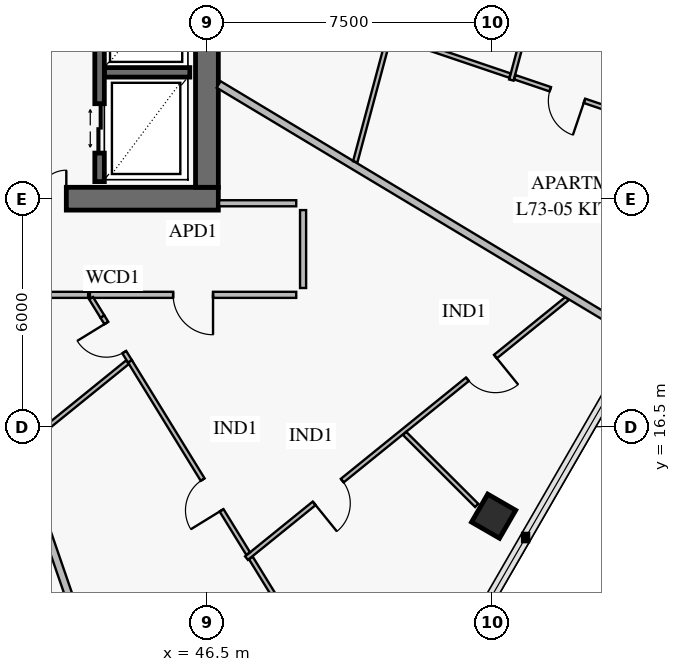
"""IFC4 building model, lengths in metres.
Left out: names, types, materials, properties, quantities, classifications, styles, units other than length and angle.
Written with IfcOpenShell. Run it as: python <this file> out.ifc"""

import sys

from ifc_helpers import new_model, si_unit, direction, frame, frame_2d, origin, origin_2d, place, context, subcontext, project, spatial, rectangle, extrude, element, fill, save


model = new_model("IFC4")
c1 = context("Model", 3, precision=1e-05, world=origin(), true_north=direction((0.0, 1.0)))
c2 = subcontext(c1, "Body", "Model", "MODEL_VIEW")
j1 = project(units=[si_unit("LENGTHUNIT", "METRE"), si_unit("PLANEANGLEUNIT", "RADIAN")], contexts=[c1])
p1 = place(None, origin())
s1 = spatial("IfcSite", under=j1, at=p1, CompositionType="ELEMENT")
p2 = place(p1, origin())
s2 = spatial("IfcBuilding", under=s1, at=p2, CompositionType="ELEMENT")
p3 = place(p2, frame((0.0, 0.0, 288.2)))
s3 = spatial("IfcBuildingStorey", under=s2, at=p3, CompositionType="ELEMENT", Elevation=288.2)
p4 = place(p3, frame((37.35, 22.5, 0.0), z_axis=(0.0, 0.0, 1.0), x_axis=(1.0, 0.0, 0.0)))
e1 = element("IfcWall", 1, at=p4, inside=s3, PredefinedType="SHEAR", context=c2, shape_type="SweptSolid", body=[
    extrude(rectangle(XDim=9.45, YDim=0.6, at=frame_2d((4.725, 0.0))), origin(), (0.0, 0.0, 1.0), 3.8),
])
p5 = place(p4, frame((3.95, 0.0, 0.0)))
e2 = element("IfcOpeningElement", 2, at=p5, cuts=e1, PredefinedType="OPENING", context=c2, shape_type="SweptSolid", body=[
    extrude(rectangle(XDim=1.5, YDim=2.15, at=frame_2d((0.75, 1.075))), frame((0.0, 0.312, 0.0), z_axis=(0.0, -1.0, 0.0), x_axis=(1.0, 0.0, 0.0)), (0.0, 0.0, 1.0), 0.624),
])
p6 = place(p3, frame((46.5, 22.8, 0.0), z_axis=(0.0, 0.0, 1.0), x_axis=(0.0, 1.0, 0.0)))
e3 = element("IfcWall", 3, at=p6, inside=s3, PredefinedType="SHEAR", context=c2, shape_type="SweptSolid", body=[
    extrude(rectangle(XDim=18.4, YDim=0.6, at=frame_2d((9.2, 0.0))), origin(), (0.0, 0.0, 1.0), 3.8),
])
p7 = place(p6, frame((8.95, 0.0, 0.0)))
e4 = element("IfcOpeningElement", 4, at=p7, cuts=e3, PredefinedType="OPENING", context=c2, shape_type="SweptSolid", body=[
    extrude(rectangle(XDim=1.1, YDim=2.15, at=frame_2d((0.55, 1.075))), frame((0.0, 0.312, 0.0), z_axis=(0.0, -1.0, 0.0), x_axis=(1.0, 0.0, 0.0)), (0.0, 0.0, 1.0), 0.624),
])
p8 = place(p3, frame((54.044, 14.145, 0.0), z_axis=(0.0, 0.0, 1.0), x_axis=(0.5, 0.866025403784, 0.0)))
e5 = element("IfcColumn", 5, at=p8, inside=s3, PredefinedType="COLUMN", context=c2, shape_type="SweptSolid", body=[
    extrude(rectangle(XDim=0.85, YDim=0.85, at=origin_2d()), origin(), (0.0, 0.0, 1.0), 3.55),
])
p9 = place(p3, frame((43.8, 25.825, 0.0), z_axis=(0.0, 0.0, 1.0), x_axis=(1.0, 0.0, 0.0)))
e6 = element("IfcWall", 6, at=p9, inside=s3, PredefinedType="SOLIDWALL", context=c2, shape_type="SweptSolid", body=[
    extrude(rectangle(XDim=2.25, YDim=0.25, at=frame_2d((1.125, 0.0))), origin(), (0.0, 0.0, 1.0), 3.8),
])
p10 = place(p3, frame((43.675, 22.95, 0.0), z_axis=(0.0, 0.0, 1.0), x_axis=(0.0, 1.0, 0.0)))
e7 = element("IfcWall", 7, at=p10, inside=s3, PredefinedType="SOLIDWALL", context=c2, shape_type="SweptSolid", body=[
    extrude(rectangle(XDim=8.2, YDim=0.25, at=frame_2d((4.1, 0.0))), origin(), (0.0, 0.0, 1.0), 3.8),
])
p11 = place(p10, frame((0.75, 0.0, 0.0)))
e8 = element("IfcOpeningElement", 8, at=p11, cuts=e7, PredefinedType="OPENING", context=c2, shape_type="SweptSolid", body=[
    extrude(rectangle(XDim=1.3, YDim=2.3, at=frame_2d((0.65, 1.15))), frame((0.0, 0.137, 0.0), z_axis=(0.0, -1.0, 0.0), x_axis=(1.0, 0.0, 0.0)), (0.0, 0.0, 1.0), 0.274),
])
p12 = place(p10, frame((3.7, 0.0, 0.0)))
e9 = element("IfcOpeningElement", 9, at=p12, cuts=e7, PredefinedType="OPENING", context=c2, shape_type="SweptSolid", body=[
    extrude(rectangle(XDim=1.3, YDim=2.3, at=frame_2d((0.65, 1.15))), frame((0.0, 0.137, 0.0), z_axis=(0.0, -1.0, 0.0), x_axis=(1.0, 0.0, 0.0)), (0.0, 0.0, 1.0), 0.274),
])
p13 = place(p10, frame((6.62, 0.0, 0.0)))
e10 = element("IfcOpeningElement", 10, at=p13, cuts=e7, PredefinedType="OPENING", context=c2, shape_type="SweptSolid", body=[
    extrude(rectangle(XDim=0.9, YDim=2.1, at=frame_2d((0.45, 1.05))), frame((0.0, 0.137, 0.0), z_axis=(0.0, -1.0, 0.0), x_axis=(1.0, 0.0, 0.0)), (0.0, 0.0, 1.0), 0.274),
])
p14 = place(p3, frame((47.542, 13.042, 0.0), z_axis=(0.0, 0.0, 1.0), x_axis=(0.777147459209, 0.629318541476, 0.0)))
e11 = element("IfcWall", 11, at=p14, inside=s3, PredefinedType="PARTITIONING", context=c2, shape_type="SweptSolid", body=[
    extrude(rectangle(XDim=10.857, YDim=0.12, at=frame_2d((5.428, 0.0))), origin(), (0.0, 0.0, 1.0), 2.95),
])
p15 = place(p14, frame((2.291, 0.0, 0.0)))
e12 = element("IfcOpeningElement", 12, at=p15, cuts=e11, PredefinedType="OPENING", context=c2, shape_type="SweptSolid", body=[
    extrude(rectangle(XDim=0.95, YDim=2.1, at=frame_2d((0.475, 1.05))), frame((0.0, 0.072, 0.0), z_axis=(0.0, -1.0, 0.0), x_axis=(1.0, 0.0, 0.0)), (0.0, 0.0, 1.0), 0.144),
])
p16 = place(p14, frame((7.479, 0.0, 0.0)))
e13 = element("IfcOpeningElement", 13, at=p16, cuts=e11, PredefinedType="OPENING", context=c2, shape_type="SweptSolid", body=[
    extrude(rectangle(XDim=0.95, YDim=2.1, at=frame_2d((0.475, 1.05))), frame((0.0, 0.072, 0.0), z_axis=(0.0, -1.0, 0.0), x_axis=(1.0, 0.0, 0.0)), (0.0, 0.0, 1.0), 0.144),
])
p17 = place(p3, frame((43.749, 19.4, 0.0), z_axis=(0.0, 0.0, 1.0), x_axis=(0.523959986515, -0.851742879355, 0.0)))
e14 = element("IfcWall", 14, at=p17, inside=s3, PredefinedType="PARTITIONING", context=c2, shape_type="SweptSolid", body=[
    extrude(rectangle(XDim=1.388, YDim=0.12, at=frame_2d((0.694, 0.0))), origin(), (0.0, 0.0, 1.0), 3.55),
])
p18 = place(p17, frame((0.2, 0.0, 0.0)))
e15 = element("IfcOpeningElement", 15, at=p18, cuts=e14, PredefinedType="OPENING", context=c2, shape_type="SweptSolid", body=[
    extrude(rectangle(XDim=0.9, YDim=2.1, at=frame_2d((0.45, 1.05))), frame((0.0, 0.072, 0.0), z_axis=(0.0, -1.0, 0.0), x_axis=(1.0, 0.0, 0.0)), (0.0, 0.0, 1.0), 0.144),
])
p19 = place(p3, frame((44.476, 18.218, 0.0), z_axis=(0.0, 0.0, 1.0), x_axis=(0.523831119105, -0.851822140272, 0.0)))
e16 = element("IfcWall", 16, at=p19, inside=s3, PredefinedType="PARTITIONING", context=c2, shape_type="SweptSolid", body=[
    extrude(rectangle(XDim=5.934, YDim=0.12, at=frame_2d((2.967, 0.0))), origin(), (0.0, 0.0, 1.0), 3.55),
])
p20 = place(p19, frame((3.65, 0.0, 0.0)))
e17 = element("IfcOpeningElement", 17, at=p20, cuts=e16, PredefinedType="OPENING", context=c2, shape_type="SweptSolid", body=[
    extrude(rectangle(XDim=0.95, YDim=2.1, at=frame_2d((0.475, 1.05))), frame((0.0, 0.072, 0.0), z_axis=(0.0, -1.0, 0.0), x_axis=(1.0, 0.0, 0.0)), (0.0, 0.0, 1.0), 0.144),
])
p21 = place(p3, frame((47.656, 13.046, 0.0), z_axis=(0.0, 0.0, 1.0), x_axis=(0.523853024062, -0.851808669351, 0.0)))
e18 = element("IfcWall", 18, at=p21, inside=s3, PredefinedType="PARTITIONING", context=c2, shape_type="SweptSolid", body=[
    extrude(rectangle(XDim=2.229, YDim=0.12, at=frame_2d((1.115, 0.0))), origin(), (0.0, 0.0, 1.0), 2.93),
])
p22 = place(p3, frame((43.421, 19.97, 0.0), z_axis=(0.0, 0.0, 1.0), x_axis=(1.0, 0.0, 0.0)))
e19 = element("IfcWall", 19, at=p22, inside=s3, PredefinedType="PARTITIONING", context=c2, shape_type="SweptSolid", body=[
    extrude(rectangle(XDim=5.429, YDim=0.16, at=frame_2d((2.714, 0.0))), origin(), (0.0, 0.0, 1.0), 2.95),
])
p23 = place(p22, frame((2.189, 0.0, 0.0)))
e20 = element("IfcOpeningElement", 20, at=p23, cuts=e19, PredefinedType="OPENING", context=c2, shape_type="SweptSolid", body=[
    extrude(rectangle(XDim=1.05, YDim=2.15, at=frame_2d((0.525, 1.075))), frame((0.0, 0.092, 0.0), z_axis=(0.0, -1.0, 0.0), x_axis=(1.0, 0.0, 0.0)), (0.0, 0.0, 1.0), 0.184),
])
p24 = place(p3, frame((54.51, 25.622, 0.0), z_axis=(0.0, 0.0, 1.0), x_axis=(0.258833493947, 0.965921954617, 0.0)))
e21 = element("IfcWall", 21, at=p24, inside=s3, PredefinedType="PARTITIONING", context=c2, shape_type="SweptSolid", body=[
    extrude(rectangle(XDim=6.89, YDim=0.12, at=frame_2d((3.445, 0.0))), origin(), (0.0, 0.0, 1.0), 2.95),
])
p25 = place(p24, frame((1.193, 0.0, 0.0)))
e22 = element("IfcOpeningElement", 22, at=p25, cuts=e21, PredefinedType="OPENING", context=c2, shape_type="SweptSolid", body=[
    extrude(rectangle(XDim=0.95, YDim=2.1, at=frame_2d((0.475, 1.05))), frame((0.0, 0.072, 0.0), z_axis=(0.0, -1.0, 0.0), x_axis=(1.0, 0.0, 0.0)), (0.0, 0.0, 1.0), 0.144),
])
p26 = place(p24, frame((4.398, 0.0, 0.0)))
e23 = element("IfcOpeningElement", 23, at=p26, cuts=e21, PredefinedType="OPENING", context=c2, shape_type="SweptSolid", body=[
    extrude(rectangle(XDim=0.95, YDim=2.1, at=frame_2d((0.475, 1.05))), frame((0.0, 0.072, 0.0), z_axis=(0.0, -1.0, 0.0), x_axis=(1.0, 0.0, 0.0)), (0.0, 0.0, 1.0), 0.144),
])
p27 = place(p3, frame((51.323, 26.808, 0.0), z_axis=(0.0, 0.0, 1.0), x_axis=(0.947092742831, -0.320960023175, 0.0)))
e24 = element("IfcWall", 24, at=p27, inside=s3, PredefinedType="PARTITIONING", context=c2, shape_type="SweptSolid", body=[
    extrude(rectangle(XDim=3.325, YDim=0.12, at=frame_2d((1.663, 0.0))), origin(), (0.0, 0.0, 1.0), 3.15),
])
p28 = place(p3, frame((54.601, 25.697, 0.0), z_axis=(0.0, 0.0, 1.0), x_axis=(0.947084656941, -0.320983882128, 0.0)))
e25 = element("IfcWall", 25, at=p28, inside=s3, PredefinedType="PARTITIONING", context=c2, shape_type="SweptSolid", body=[
    extrude(rectangle(XDim=6.432, YDim=0.12, at=frame_2d((3.216, 0.0))), origin(), (0.0, 0.0, 1.0), 2.93),
])
p29 = place(p28, frame((0.985, 0.0, 0.0)))
e26 = element("IfcOpeningElement", 26, at=p29, cuts=e25, PredefinedType="OPENING", context=c2, shape_type="SweptSolid", body=[
    extrude(rectangle(XDim=0.95, YDim=2.1, at=frame_2d((0.475, 1.05))), frame((0.0, 0.072, 0.0), z_axis=(0.0, -1.0, 0.0), x_axis=(1.0, 0.0, 0.0)), (0.0, 0.0, 1.0), 0.144),
])
p30 = place(p3, frame((40.128, 20.01, 0.0), z_axis=(0.0, 0.0, 1.0), x_axis=(0.325569269748, -0.945518191573, 0.0)))
e27 = element("IfcWall", 27, at=p30, inside=s3, PredefinedType="PARTITIONING", context=c2, shape_type="SweptSolid", body=[
    extrude(rectangle(XDim=14.356, YDim=0.2, at=frame_2d((7.178, 0.0))), origin(), (0.0, 0.0, 1.0), 2.93),
])
p31 = place(p3, frame((51.702, 16.323, 0.0), z_axis=(0.0, 0.0, 1.0), x_axis=(0.707607548717, -0.706605658765, 0.0)))
e28 = element("IfcWall", 28, at=p31, inside=s3, PredefinedType="PARTITIONING", context=c2, shape_type="SweptSolid", body=[
    extrude(rectangle(XDim=2.68, YDim=0.12, at=frame_2d((1.34, 0.0))), origin(), (0.0, 0.0, 1.0), 2.95),
])
p32 = place(p3, frame((43.452, 19.882, 0.0), z_axis=(0.0, 0.0, 1.0), x_axis=(0.52366415223, -0.851924794609, 0.0)))
e29 = element("IfcWall", 29, at=p32, inside=s3, PredefinedType="PARTITIONING", context=c2, shape_type="SweptSolid", body=[
    extrude(rectangle(XDim=0.566, YDim=0.12, at=frame_2d((0.283, 0.0))), origin(), (0.0, 0.0, 1.0), 3.55),
])
p33 = place(p3, frame((41.639, 15.954, 0.0), z_axis=(0.0, 0.0, 1.0), x_axis=(0.777152329868, 0.629312526636, 0.0)))
e30 = element("IfcWall", 30, at=p33, inside=s3, PredefinedType="PARTITIONING", context=c2, shape_type="SweptSolid", body=[
    extrude(rectangle(XDim=3.564, YDim=0.12, at=frame_2d((1.782, 0.0))), origin(), (0.0, 0.0, 1.0), 3.55),
])
p34 = place(p3, frame((46.808, 25.506, 0.0), z_axis=(0.0, 0.0, 1.0), x_axis=(0.85716526059, -0.515041470212, 0.0)))
e31 = element("IfcWall", 31, at=p34, inside=s3, PredefinedType="PARTITIONING", context=c2, shape_type="SweptSolid", body=[
    extrude(rectangle(XDim=12.958, YDim=0.2, at=frame_2d((6.479, 0.0))), origin(), (0.0, 0.0, 1.0), 2.93),
])
p35 = place(p3, frame((50.403, 23.472, 0.0), z_axis=(0.0, 0.0, 1.0), x_axis=(0.25876844848, 0.965939382193, 0.0)))
e32 = element("IfcWall", 32, at=p35, inside=s3, PredefinedType="PARTITIONING", context=c2, shape_type="SweptSolid", body=[
    extrude(rectangle(XDim=3.394, YDim=0.12, at=frame_2d((1.697, 0.0))), origin(), (0.0, 0.0, 1.0), 3.55),
])
p36 = place(p3, frame((49.03, 20.15, 0.0), z_axis=(0.0, 0.0, 1.0), x_axis=(0.0, 1.0, 0.0)))
e33 = element("IfcWall", 33, at=p36, inside=s3, PredefinedType="PARTITIONING", context=c2, shape_type="SweptSolid", body=[
    extrude(rectangle(XDim=2.05, YDim=0.16, at=frame_2d((1.025, 0.0))), origin(), (0.0, 0.0, 1.0), 3.55),
])
p37 = place(p3, frame((48.85, 22.38, 0.0), z_axis=(0.0, 0.0, 1.0), x_axis=(-1.0, 0.0, 0.0)))
e34 = element("IfcWall", 34, at=p37, inside=s3, PredefinedType="PARTITIONING", context=c2, shape_type="SweptSolid", body=[
    extrude(rectangle(XDim=2.03, YDim=0.16, at=frame_2d((1.015, 0.0))), origin(), (0.0, 0.0, 1.0), 3.55),
])
p38 = place(p3, frame((40.281, 19.97, 0.0), z_axis=(0.0, 0.0, 1.0), x_axis=(1.0, 0.0, 0.0)))
e35 = element("IfcWall", 35, at=p38, inside=s3, PredefinedType="PARTITIONING", context=c2, shape_type="SweptSolid", body=[
    extrude(rectangle(XDim=3.093, YDim=0.16, at=frame_2d((1.547, 0.0))), origin(), (0.0, 0.0, 1.0), 3.55),
])
p39 = place(p5, origin())
e36 = element("IfcDoor", 36, at=p39, inside=s3, OperationType="DOUBLE_DOOR_SINGLE_SWING", PredefinedType="DOOR", context=c2, shape_type="SweptSolid", body=[
    extrude(rectangle(XDim=1.5, YDim=2.15, at=frame_2d((0.75, 1.075))), frame((0.0, 0.025, 0.0), z_axis=(0.0, -1.0, 0.0), x_axis=(1.0, 0.0, 0.0)), (0.0, 0.0, 1.0), 0.05),
])
fill(e2, e36)
p40 = place(p11, origin())
e37 = element("IfcDoor", 37, at=p40, inside=s3, OperationType="DOUBLE_DOOR_SLIDING", PredefinedType="DOOR", context=c2, shape_type="SweptSolid", body=[
    extrude(rectangle(XDim=1.3, YDim=2.3, at=frame_2d((0.65, 1.15))), frame((0.0, 0.025, 0.0), z_axis=(0.0, -1.0, 0.0), x_axis=(1.0, 0.0, 0.0)), (0.0, 0.0, 1.0), 0.05),
])
fill(e8, e37)
p41 = place(p15, frame((0.95, 0.0, 0.0), z_axis=(0.0, 0.0, 1.0), x_axis=(-1.0, 0.0, 0.0)))
e38 = element("IfcDoor", 38, at=p41, inside=s3, OperationType="SINGLE_SWING_RIGHT", PredefinedType="DOOR", context=c2, shape_type="SweptSolid", body=[
    extrude(rectangle(XDim=0.95, YDim=2.1, at=frame_2d((0.475, 1.05))), frame((0.0, 0.025, 0.0), z_axis=(0.0, -1.0, 0.0), x_axis=(1.0, 0.0, 0.0)), (0.0, 0.0, 1.0), 0.05),
])
fill(e12, e38)
p42 = place(p16, frame((0.95, 0.0, 0.0), z_axis=(0.0, 0.0, 1.0), x_axis=(-1.0, 0.0, 0.0)))
e39 = element("IfcDoor", 39, at=p42, inside=s3, OperationType="SINGLE_SWING_LEFT", PredefinedType="DOOR", context=c2, shape_type="SweptSolid", body=[
    extrude(rectangle(XDim=0.95, YDim=2.1, at=frame_2d((0.475, 1.05))), frame((0.0, 0.025, 0.0), z_axis=(0.0, -1.0, 0.0), x_axis=(1.0, 0.0, 0.0)), (0.0, 0.0, 1.0), 0.05),
])
fill(e13, e39)
p43 = place(p18, frame((0.9, 0.0, 0.0), z_axis=(0.0, 0.0, 1.0), x_axis=(-1.0, 0.0, 0.0)))
e40 = element("IfcDoor", 40, at=p43, inside=s3, OperationType="SINGLE_SWING_RIGHT", PredefinedType="DOOR", context=c2, shape_type="SweptSolid", body=[
    extrude(rectangle(XDim=0.9, YDim=2.1, at=frame_2d((0.45, 1.05))), frame((0.0, 0.025, 0.0), z_axis=(0.0, -1.0, 0.0), x_axis=(1.0, 0.0, 0.0)), (0.0, 0.0, 1.0), 0.05),
])
fill(e15, e40)
p44 = place(p20, frame((0.95, 0.0, 0.0), z_axis=(0.0, 0.0, 1.0), x_axis=(-1.0, 0.0, 0.0)))
e41 = element("IfcDoor", 41, at=p44, inside=s3, OperationType="SINGLE_SWING_LEFT", PredefinedType="DOOR", context=c2, shape_type="SweptSolid", body=[
    extrude(rectangle(XDim=0.95, YDim=2.1, at=frame_2d((0.475, 1.05))), frame((0.0, 0.025, 0.0), z_axis=(0.0, -1.0, 0.0), x_axis=(1.0, 0.0, 0.0)), (0.0, 0.0, 1.0), 0.05),
])
fill(e17, e41)
p45 = place(p23, frame((1.05, 0.0, 0.0), z_axis=(0.0, 0.0, 1.0), x_axis=(-1.0, 0.0, 0.0)))
e42 = element("IfcDoor", 42, at=p45, inside=s3, OperationType="SINGLE_SWING_LEFT", PredefinedType="DOOR", context=c2, shape_type="SweptSolid", body=[
    extrude(rectangle(XDim=1.05, YDim=2.15, at=frame_2d((0.525, 1.075))), frame((0.0, 0.025, 0.0), z_axis=(0.0, -1.0, 0.0), x_axis=(1.0, 0.0, 0.0)), (0.0, 0.0, 1.0), 0.05),
])
fill(e20, e42)
p46 = place(p29, frame((0.95, 0.0, 0.0), z_axis=(0.0, 0.0, 1.0), x_axis=(-1.0, 0.0, 0.0)))
e43 = element("IfcDoor", 43, at=p46, inside=s3, OperationType="SINGLE_SWING_LEFT", PredefinedType="DOOR", context=c2, shape_type="SweptSolid", body=[
    extrude(rectangle(XDim=0.95, YDim=2.1, at=frame_2d((0.475, 1.05))), frame((0.0, 0.025, 0.0), z_axis=(0.0, -1.0, 0.0), x_axis=(1.0, 0.0, 0.0)), (0.0, 0.0, 1.0), 0.05),
])
fill(e26, e43)
save(model, sys.argv[1])
